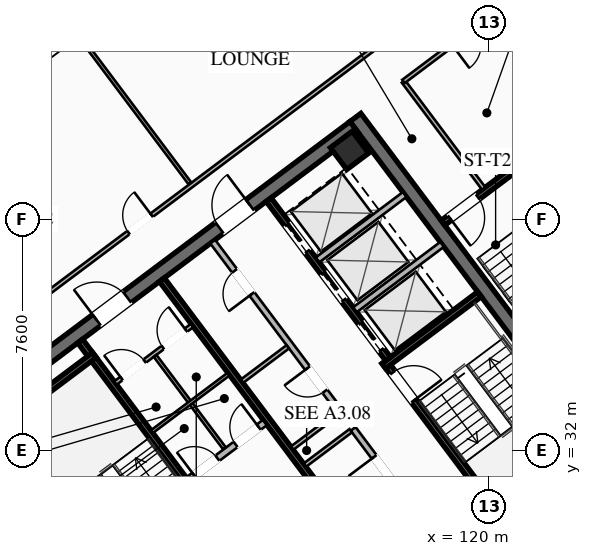
"""IFC4 building model, lengths in metres.
Left out: names, types, materials, properties, quantities, classifications, styles, units other than length and angle.
Written with IfcOpenShell. Run it as: python <this file> out.ifc"""

import sys

from ifc_helpers import new_model, si_unit, direction, frame, frame_2d, origin, origin_2d, place, context, subcontext, project, spatial, rectangle, hollow_rectangle, extrude, element, fill, save


model = new_model("IFC4")
c1 = context("Model", 3, precision=1e-05, world=origin(), true_north=direction((0.0, 1.0)))
c2 = subcontext(c1, "Body", "Model", "MODEL_VIEW")
j1 = project(units=[si_unit("LENGTHUNIT", "METRE"), si_unit("PLANEANGLEUNIT", "RADIAN")], contexts=[c1])
p1 = place(None, origin())
s1 = spatial("IfcSite", under=j1, at=p1, CompositionType="ELEMENT")
p2 = place(p1, origin())
s2 = spatial("IfcBuilding", under=s1, at=p2, CompositionType="ELEMENT")
p3 = place(p2, frame((0.0, 0.0, 218.4)))
s3 = spatial("IfcBuildingStorey", under=s2, at=p3, CompositionType="ELEMENT", Elevation=218.4)
for number, where, z_axis, x_axis in (
    (1, (112.396, 21.047, 0.0), (0.0, 0.0, 1.0), (-0.6, 0.8, 0.0)),
    (2, (115.604, 42.953, 0.0), (0.0, 0.0, 1.0), (0.6, -0.8, 0.0)),
):
    element("IfcWall", number, at=place(p3, frame(where, z_axis=z_axis, x_axis=x_axis)), inside=s3, PredefinedType="SHEAR", context=c2, shape_type="SweptSolid", body=[
        extrude(rectangle(XDim=15.6, YDim=0.45, at=frame_2d((7.8, 0.0))), origin(), (0.0, 0.0, 1.0), 3.55),
    ])
p4 = place(p3, frame((103.351, 33.482, 0.0), z_axis=(0.0, 0.0, 1.0), x_axis=(0.8, 0.6, 0.0)))
e3 = element("IfcWall", 3, at=p4, inside=s3, PredefinedType="SHEAR", context=c2, shape_type="SweptSolid", body=[
    extrude(rectangle(XDim=15.26, YDim=0.45, at=frame_2d((7.63, 0.0))), origin(), (0.0, 0.0, 1.0), 3.55),
])
p5 = place(p4, frame((4.68, 0.0, 0.0)))
e4 = element("IfcOpeningElement", 4, at=p5, cuts=e3, PredefinedType="OPENING", context=c2, shape_type="SweptSolid", body=[
    extrude(rectangle(XDim=1.25, YDim=2.25, at=frame_2d((0.625, 1.125))), frame((0.0, 0.235, 0.0), z_axis=(0.0, -1.0, 0.0), x_axis=(1.0, 0.0, 0.0)), (0.0, 0.0, 1.0), 0.47),
])
p6 = place(p4, frame((9.73, 0.0, 0.0)))
e5 = element("IfcOpeningElement", 5, at=p6, cuts=e3, PredefinedType="OPENING", context=c2, shape_type="SweptSolid", body=[
    extrude(rectangle(XDim=1.25, YDim=2.25, at=frame_2d((0.625, 1.125))), frame((0.0, 0.235, 0.0), z_axis=(0.0, -1.0, 0.0), x_axis=(1.0, 0.0, 0.0)), (0.0, 0.0, 1.0), 0.47),
])
p7 = place(p3, frame((115.41, 41.87, 0.0), z_axis=(0.0, 0.0, 1.0), x_axis=(0.799999996291, 0.600000004945, 0.0)))
e6 = element("IfcColumn", 6, at=p7, inside=s3, PredefinedType="COLUMN", context=c2, shape_type="SweptSolid", body=[
    extrude(hollow_rectangle(XDim=0.9, YDim=0.9, WallThickness=0.04, at=origin_2d()), origin(), (0.0, 0.0, 1.0), 3.37),
])
p8 = place(p3, frame((111.44, 29.08, 0.0), z_axis=(0.0, 0.0, 1.0), x_axis=(-0.59999041401, 0.800007189403, 0.0)))
e7 = element("IfcWall", 7, at=p8, inside=s3, PredefinedType="SHEAR", context=c2, shape_type="SweptSolid", body=[
    extrude(rectangle(XDim=8.15, YDim=0.2, at=frame_2d((4.075, 0.0))), origin(), (0.0, 0.0, 1.0), 3.37),
])
p9 = place(p8, frame((0.45, 0.0, 0.0)))
e8 = element("IfcOpeningElement", 8, at=p9, cuts=e7, PredefinedType="OPENING", context=c2, shape_type="SweptSolid", body=[
    extrude(rectangle(XDim=1.15, YDim=2.2, at=frame_2d((0.575, 1.1))), frame((0.0, 0.11, 0.0), z_axis=(0.0, -1.0, 0.0), x_axis=(1.0, 0.0, 0.0)), (0.0, 0.0, 1.0), 0.22),
])
p10 = place(p3, frame((103.876, 32.782, 0.0), z_axis=(0.0, 0.0, 1.0), x_axis=(0.800014909178, 0.599980120581, 0.0)))
e9 = element("IfcWall", 9, at=p10, inside=s3, PredefinedType="SHEAR", context=c2, shape_type="SweptSolid", body=[
    extrude(rectangle(XDim=3.93, YDim=0.2, at=frame_2d((1.965, 0.0))), origin(), (0.0, 0.0, 1.0), 3.37),
])
p11 = place(p3, frame((116.56, 34.92, 0.0), z_axis=(0.0, 0.0, 1.0), x_axis=(0.59999041401, -0.800007189403, 0.0)))
e10 = element("IfcWall", 10, at=p11, inside=s3, PredefinedType="SHEAR", context=c2, shape_type="SweptSolid", body=[
    extrude(rectangle(XDim=8.15, YDim=0.2, at=frame_2d((4.075, 0.0))), origin(), (0.0, 0.0, 1.0), 3.37),
])
p12 = place(p11, frame((0.45, 0.0, 0.0)))
e11 = element("IfcOpeningElement", 11, at=p12, cuts=e10, PredefinedType="OPENING", context=c2, shape_type="SweptSolid", body=[
    extrude(rectangle(XDim=1.15, YDim=2.2, at=frame_2d((0.575, 1.1))), frame((0.0, 0.11, 0.0), z_axis=(0.0, -1.0, 0.0), x_axis=(1.0, 0.0, 0.0)), (0.0, 0.0, 1.0), 0.22),
])
p13 = place(p3, frame((116.54, 34.78, 0.0), z_axis=(0.0, 0.0, 1.0), x_axis=(0.800014909178, 0.599980120581, 0.0)))
e12 = element("IfcWall", 12, at=p13, inside=s3, PredefinedType="SHEAR", context=c2, shape_type="SweptSolid", body=[
    extrude(rectangle(XDim=3.93, YDim=0.2, at=frame_2d((1.965, 0.0))), origin(), (0.0, 0.0, 1.0), 3.37),
])
p14 = place(p3, frame((118.058, 25.856, 0.0), z_axis=(0.0, 0.0, 1.0), x_axis=(-0.600002657301, 0.799998007018, 0.0)))
e13 = element("IfcWall", 13, at=p14, inside=s3, PredefinedType="SHEAR", context=c2, shape_type="SweptSolid", body=[
    extrude(rectangle(XDim=14.7, YDim=0.2, at=frame_2d((7.35, 0.0))), origin(), (0.0, 0.0, 1.0), 3.37),
])
p15 = place(p3, frame((110.104, 31.028, 0.0), z_axis=(0.0, 0.0, 1.0), x_axis=(0.800018601094, 0.59997519774, 0.0)))
e14 = element("IfcWall", 14, at=p15, inside=s3, PredefinedType="SOLIDWALL", context=c2, shape_type="SweptSolid", body=[
    extrude(rectangle(XDim=3.15, YDim=0.22, at=frame_2d((1.575, 0.0))), origin(), (0.0, 0.0, 1.0), 2.723),
])
p16 = place(p15, frame((0.25, 0.0, 0.0)))
e15 = element("IfcOpeningElement", 15, at=p16, cuts=e14, PredefinedType="OPENING", context=c2, shape_type="SweptSolid", body=[
    extrude(rectangle(XDim=0.95, YDim=2.05, at=frame_2d((0.475, 1.025))), frame((0.0, 0.12, 0.0), z_axis=(0.0, -1.0, 0.0), x_axis=(1.0, 0.0, 0.0)), (0.0, 0.0, 1.0), 0.24),
])
p17 = place(p15, frame((1.95, 0.0, 0.0)))
e16 = element("IfcOpeningElement", 16, at=p17, cuts=e14, PredefinedType="OPENING", context=c2, shape_type="SweptSolid", body=[
    extrude(rectangle(XDim=0.95, YDim=2.05, at=frame_2d((0.475, 1.025))), frame((0.0, 0.12, 0.0), z_axis=(0.0, -1.0, 0.0), x_axis=(1.0, 0.0, 0.0)), (0.0, 0.0, 1.0), 0.24),
])
p18 = place(p3, frame((112.75, 40.25, 0.0), z_axis=(0.0, 0.0, 1.0), x_axis=(0.599994036198, -0.800004472816, 0.0)))
e17 = element("IfcWall", 17, at=p18, inside=s3, PredefinedType="SHEAR", context=c2, shape_type="SweptSolid", body=[
    extrude(rectangle(XDim=6.55, YDim=0.2, at=frame_2d((3.275, 0.0))), origin(), (0.0, 0.0, 1.0), 3.37),
])
p19 = place(p18, frame((5.075, 0.0, 0.0)))
e18 = element("IfcOpeningElement", 18, at=p19, cuts=e17, PredefinedType="OPENING", context=c2, shape_type="SweptSolid", body=[
    extrude(rectangle(XDim=1.1, YDim=2.2, at=frame_2d((0.55, 1.1))), frame((0.0, 0.11, 0.0), z_axis=(0.0, -1.0, 0.0), x_axis=(1.0, 0.0, 0.0)), (0.0, 0.0, 1.0), 0.22),
])
p20 = place(p18, frame((3.025, 0.0, 0.0)))
e19 = element("IfcOpeningElement", 19, at=p20, cuts=e17, PredefinedType="OPENING", context=c2, shape_type="SweptSolid", body=[
    extrude(rectangle(XDim=1.1, YDim=2.2, at=frame_2d((0.55, 1.1))), frame((0.0, 0.11, 0.0), z_axis=(0.0, -1.0, 0.0), x_axis=(1.0, 0.0, 0.0)), (0.0, 0.0, 1.0), 0.22),
])
p21 = place(p18, frame((1.025, 0.0, 0.0)))
e20 = element("IfcOpeningElement", 20, at=p21, cuts=e17, PredefinedType="OPENING", context=c2, shape_type="SweptSolid", body=[
    extrude(rectangle(XDim=1.1, YDim=2.2, at=frame_2d((0.55, 1.1))), frame((0.0, 0.11, 0.0), z_axis=(0.0, -1.0, 0.0), x_axis=(1.0, 0.0, 0.0)), (0.0, 0.0, 1.0), 0.22),
])
for number, where, z_axis, x_axis in (
    (21, (115.59, 36.63, 0.0), (0.0, 0.0, 1.0), (0.8, 0.6, 0.0)),
    (22, (114.36, 38.27, 0.0), (0.0, 0.0, 1.0), (0.8, 0.6, 0.0)),
):
    element("IfcWall", number, at=place(p3, frame(where, z_axis=z_axis, x_axis=x_axis)), inside=s3, PredefinedType="SOLIDWALL", context=c2, shape_type="SweptSolid", body=[
        extrude(rectangle(XDim=3.58, YDim=0.2, at=frame_2d((1.79, 0.0))), origin(), (0.0, 0.0, 1.0), 3.37),
    ])
p22 = place(p3, frame((107.71, 34.22, 0.0), z_axis=(0.0, 0.0, 1.0), x_axis=(0.799981399002, 0.60002480053, 0.0)))
e23 = element("IfcWall", 23, at=p22, inside=s3, PredefinedType="PARTITIONING", context=c2, shape_type="SweptSolid", body=[
    extrude(rectangle(XDim=3.15, YDim=0.135, at=frame_2d((1.575, 0.0))), origin(), (0.0, 0.0, 1.0), 2.723),
])
p23 = place(p22, frame((0.25, 0.0, 0.0)))
e24 = element("IfcOpeningElement", 24, at=p23, cuts=e23, PredefinedType="OPENING", context=c2, shape_type="SweptSolid", body=[
    extrude(rectangle(XDim=0.95, YDim=2.05, at=frame_2d((0.475, 1.025))), frame((0.0, 0.077, 0.0), z_axis=(0.0, -1.0, 0.0), x_axis=(1.0, 0.0, 0.0)), (0.0, 0.0, 1.0), 0.155),
])
p24 = place(p22, frame((1.95, 0.0, 0.0)))
e25 = element("IfcOpeningElement", 25, at=p24, cuts=e23, PredefinedType="OPENING", context=c2, shape_type="SweptSolid", body=[
    extrude(rectangle(XDim=0.95, YDim=2.05, at=frame_2d((0.475, 1.025))), frame((0.0, 0.077, 0.0), z_axis=(0.0, -1.0, 0.0), x_axis=(1.0, 0.0, 0.0)), (0.0, 0.0, 1.0), 0.155),
])
p25 = place(p3, frame((111.296, 32.072, 0.0), z_axis=(0.0, 0.0, 1.0), x_axis=(-0.59995887973, 0.800030838552, 0.0)))
e26 = element("IfcWall", 26, at=p25, inside=s3, PredefinedType="PARTITIONING", context=c2, shape_type="SweptSolid", body=[
    extrude(rectangle(XDim=3.8, YDim=0.11, at=frame_2d((1.9, 0.0))), origin(), (0.0, 0.0, 1.0), 2.723),
])
p26 = place(p3, frame((108.91, 32.62, 0.0), z_axis=(0.0, 0.0, 1.0), x_axis=(0.800018601094, 0.59997519774, 0.0)))
e27 = element("IfcWall", 27, at=p26, inside=s3, PredefinedType="PARTITIONING", context=c2, shape_type="SweptSolid", body=[
    extrude(rectangle(XDim=3.15, YDim=0.11, at=frame_2d((1.575, 0.0))), origin(), (0.0, 0.0, 1.0), 2.723),
])
p27 = place(p3, frame((119.73, 27.11, 0.0), z_axis=(0.0, 0.0, 1.0), x_axis=(-0.600005580459, 0.799995814625, 0.0)))
e28 = element("IfcWall", 28, at=p27, inside=s3, PredefinedType="SOLIDWALL", context=c2, shape_type="SweptSolid", body=[
    extrude(rectangle(XDim=7.0, YDim=0.2, at=frame_2d((3.5, 0.0))), origin(), (0.0, 0.0, 1.0), 2.723),
])
p28 = place(p27, frame((0.85, 0.0, 0.0)))
e29 = element("IfcOpeningElement", 29, at=p28, cuts=e28, PredefinedType="OPENING", context=c2, shape_type="SweptSolid", body=[
    extrude(rectangle(XDim=0.95, YDim=2.05, at=frame_2d((0.475, 1.025))), frame((0.0, 0.11, 0.0), z_axis=(0.0, -1.0, 0.0), x_axis=(1.0, 0.0, 0.0)), (0.0, 0.0, 1.0), 0.22),
])
p29 = place(p27, frame((4.8, 0.0, 0.0)))
e30 = element("IfcOpeningElement", 30, at=p29, cuts=e28, PredefinedType="OPENING", context=c2, shape_type="SweptSolid", body=[
    extrude(rectangle(XDim=1.05, YDim=2.2, at=frame_2d((0.525, 1.1))), frame((0.0, 0.11, 0.0), z_axis=(0.0, -1.0, 0.0), x_axis=(1.0, 0.0, 0.0)), (0.0, 0.0, 1.0), 0.22),
])
p30 = place(p3, frame((113.946, 31.522, 0.0), z_axis=(0.0, 0.0, 1.0), x_axis=(0.8, 0.6, 0.0)))
e31 = element("IfcWall", 31, at=p30, inside=s3, PredefinedType="PARTITIONING", context=c2, shape_type="SweptSolid", body=[
    extrude(rectangle(XDim=1.88, YDim=0.135, at=frame_2d((0.94, 0.0))), origin(), (0.0, 0.0, 1.0), 2.723),
])
p31 = place(p3, frame((115.11, 33.27, 0.0), z_axis=(0.0, 0.0, 1.0), x_axis=(-0.600011160345, 0.79999162962, 0.0)))
e32 = element("IfcWall", 32, at=p31, inside=s3, PredefinedType="SOLIDWALL", context=c2, shape_type="SweptSolid", body=[
    extrude(rectangle(XDim=7.0, YDim=0.2, at=frame_2d((3.5, 0.0))), origin(), (0.0, 0.0, 1.0), 2.723),
])
p32 = place(p31, frame((0.85, 0.0, 0.0)))
e33 = element("IfcOpeningElement", 33, at=p32, cuts=e32, PredefinedType="OPENING", context=c2, shape_type="SweptSolid", body=[
    extrude(rectangle(XDim=0.95, YDim=2.05, at=frame_2d((0.475, 1.025))), frame((0.0, 0.11, 0.0), z_axis=(0.0, -1.0, 0.0), x_axis=(1.0, 0.0, 0.0)), (0.0, 0.0, 1.0), 0.22),
])
p33 = place(p31, frame((4.85, 0.0, 0.0)))
e34 = element("IfcOpeningElement", 34, at=p33, cuts=e32, PredefinedType="OPENING", context=c2, shape_type="SweptSolid", body=[
    extrude(rectangle(XDim=0.95, YDim=2.05, at=frame_2d((0.475, 1.025))), frame((0.0, 0.11, 0.0), z_axis=(0.0, -1.0, 0.0), x_axis=(1.0, 0.0, 0.0)), (0.0, 0.0, 1.0), 0.22),
])
p34 = place(p3, frame((113.526, 32.082, 0.0), z_axis=(0.0, 0.0, 1.0), x_axis=(0.800046745961, 0.599937666993, 0.0)))
e35 = element("IfcWall", 35, at=p34, inside=s3, PredefinedType="PARTITIONING", context=c2, shape_type="SweptSolid", body=[
    extrude(rectangle(XDim=1.88, YDim=0.135, at=frame_2d((0.94, 0.0))), origin(), (0.0, 0.0, 1.0), 2.723),
])
p35 = place(p3, frame((111.876, 34.282, 0.0), z_axis=(0.0, 0.0, 1.0), x_axis=(0.8, 0.6, 0.0)))
e36 = element("IfcWall", 36, at=p35, inside=s3, PredefinedType="PARTITIONING", context=c2, shape_type="SweptSolid", body=[
    extrude(rectangle(XDim=1.88, YDim=0.135, at=frame_2d((0.94, 0.0))), origin(), (0.0, 0.0, 1.0), 2.723),
])
p36 = place(p3, frame((121.204, 41.528, 0.0), z_axis=(0.0, 0.0, 1.0), x_axis=(-0.800017232136, -0.599977023131, 0.0)))
e37 = element("IfcWall", 37, at=p36, inside=s3, PredefinedType="SHEAR", context=c2, shape_type="SweptSolid", body=[
    extrude(rectangle(XDim=3.4, YDim=0.2, at=frame_2d((1.7, 0.0))), origin(), (0.0, 0.0, 1.0), 3.37),
])
p37 = place(p36, frame((1.975, 0.0, 0.0)))
e38 = element("IfcOpeningElement", 38, at=p37, cuts=e37, PredefinedType="OPENING", context=c2, shape_type="SweptSolid", body=[
    extrude(rectangle(XDim=1.15, YDim=2.2, at=frame_2d((0.575, 1.1))), frame((0.0, 0.11, 0.0), z_axis=(0.0, -1.0, 0.0), x_axis=(1.0, 0.0, 0.0)), (0.0, 0.0, 1.0), 0.22),
])
p38 = place(p3, frame((119.824, 40.618, 0.0), z_axis=(0.0, 0.0, 1.0), x_axis=(-0.599982243973, 0.800013316712, 0.0)))
e39 = element("IfcWall", 39, at=p38, inside=s3, PredefinedType="PARTITIONING", context=c2, shape_type="SweptSolid", body=[
    extrude(rectangle(XDim=4.4, YDim=0.135, at=frame_2d((2.2, 0.0))), origin(), (0.0, 0.0, 1.0), 2.723),
])
p39 = place(p3, frame((100.826, 33.682, 0.0), z_axis=(0.0, 0.0, 1.0), x_axis=(0.79999742786, 0.600003429504, 0.0)))
e40 = element("IfcWall", 40, at=p39, inside=s3, PredefinedType="PARTITIONING", context=c2, shape_type="SweptSolid", body=[
    extrude(rectangle(XDim=22.78, YDim=0.135, at=frame_2d((11.39, 0.0))), origin(), (0.0, 0.0, 1.0), 2.723),
])
p40 = place(p39, frame((0.3, 0.0, 0.0)))
e41 = element("IfcOpeningElement", 41, at=p40, cuts=e40, PredefinedType="OPENING", context=c2, shape_type="SweptSolid", body=[
    extrude(rectangle(XDim=0.95, YDim=2.05, at=frame_2d((0.475, 1.025))), frame((0.0, 0.077, 0.0), z_axis=(0.0, -1.0, 0.0), x_axis=(1.0, 0.0, 0.0)), (0.0, 0.0, 1.0), 0.155),
])
p41 = place(p39, frame((9.143, 0.0, 0.0)))
e42 = element("IfcOpeningElement", 42, at=p41, cuts=e40, PredefinedType="OPENING", context=c2, shape_type="SweptSolid", body=[
    extrude(rectangle(XDim=0.95, YDim=2.05, at=frame_2d((0.475, 1.025))), frame((0.0, 0.077, 0.0), z_axis=(0.0, -1.0, 0.0), x_axis=(1.0, 0.0, 0.0)), (0.0, 0.0, 1.0), 0.155),
])
p42 = place(p39, frame((21.53, 0.0, 0.0)))
e43 = element("IfcOpeningElement", 43, at=p42, cuts=e40, PredefinedType="OPENING", context=c2, shape_type="SweptSolid", body=[
    extrude(rectangle(XDim=0.95, YDim=2.05, at=frame_2d((0.475, 1.025))), frame((0.0, 0.077, 0.0), z_axis=(0.0, -1.0, 0.0), x_axis=(1.0, 0.0, 0.0)), (0.0, 0.0, 1.0), 0.155),
])
p43 = place(p3, frame((110.162, 40.784, 0.0), z_axis=(0.0, 0.0, 1.0), x_axis=(-0.600006351355, 0.799995236444, 0.0)))
e44 = element("IfcWall", 44, at=p43, inside=s3, PredefinedType="PARTITIONING", context=c2, shape_type="SweptSolid", body=[
    extrude(rectangle(XDim=6.15, YDim=0.11, at=frame_2d((3.075, 0.0))), origin(), (0.0, 0.0, 1.0), 2.723),
])
p44 = place(p3, frame((121.584, 47.438, 0.0), z_axis=(0.0, 0.0, 1.0), x_axis=(-0.79998934637, -0.600014204577, 0.0)))
e45 = element("IfcWall", 45, at=p44, inside=s3, PredefinedType="PARTITIONING", context=c2, shape_type="SweptSolid", body=[
    extrude(rectangle(XDim=5.5, YDim=0.135, at=frame_2d((2.75, 0.0))), origin(), (0.0, 0.0, 1.0), 2.723),
])
p45 = place(p44, frame((2.55, 0.0, 0.0)))
e46 = element("IfcOpeningElement", 46, at=p45, cuts=e45, PredefinedType="OPENING", context=c2, shape_type="SweptSolid", body=[
    extrude(rectangle(XDim=0.95, YDim=2.05, at=frame_2d((0.475, 1.025))), frame((0.0, 0.077, 0.0), z_axis=(0.0, -1.0, 0.0), x_axis=(1.0, 0.0, 0.0)), (0.0, 0.0, 1.0), 0.155),
])
p46 = place(p3, frame((113.09, 17.33, 0.0), z_axis=(0.0, 0.0, 1.0), x_axis=(-0.60000575578, 0.799995683132, 0.0)))
e47 = element("IfcWall", 47, at=p46, inside=s3, PredefinedType="PARTITIONING", context=c2, shape_type="SweptSolid", body=[
    extrude(rectangle(XDim=20.36, YDim=0.135, at=frame_2d((10.18, 0.0))), origin(), (0.0, 0.0, 1.0), 2.723),
])
p47 = place(p46, frame((0.3, 0.0, 0.0)))
e48 = element("IfcOpeningElement", 48, at=p47, cuts=e47, PredefinedType="OPENING", context=c2, shape_type="SweptSolid", body=[
    extrude(rectangle(XDim=0.95, YDim=2.05, at=frame_2d((0.475, 1.025))), frame((0.0, 0.077, 0.0), z_axis=(0.0, -1.0, 0.0), x_axis=(1.0, 0.0, 0.0)), (0.0, 0.0, 1.0), 0.155),
])
p48 = place(p5, origin())
e49 = element("IfcDoor", 49, at=p48, inside=s3, OperationType="SINGLE_SWING_LEFT", PredefinedType="DOOR", context=c2, shape_type="SweptSolid", body=[
    extrude(rectangle(XDim=1.25, YDim=2.25, at=frame_2d((0.625, 1.125))), frame((0.0, 0.025, 0.0), z_axis=(0.0, -1.0, 0.0), x_axis=(1.0, 0.0, 0.0)), (0.0, 0.0, 1.0), 0.05),
])
fill(e4, e49)
p49 = place(p6, origin())
e50 = element("IfcDoor", 50, at=p49, inside=s3, OperationType="SINGLE_SWING_RIGHT", PredefinedType="DOOR", context=c2, shape_type="SweptSolid", body=[
    extrude(rectangle(XDim=1.25, YDim=2.25, at=frame_2d((0.625, 1.125))), frame((0.0, 0.025, 0.0), z_axis=(0.0, -1.0, 0.0), x_axis=(1.0, 0.0, 0.0)), (0.0, 0.0, 1.0), 0.05),
])
fill(e5, e50)
p50 = place(p12, origin())
e51 = element("IfcDoor", 51, at=p50, inside=s3, OperationType="SINGLE_SWING_RIGHT", PredefinedType="DOOR", context=c2, shape_type="SweptSolid", body=[
    extrude(rectangle(XDim=1.15, YDim=2.2, at=frame_2d((0.575, 1.1))), frame((0.0, 0.025, 0.0), z_axis=(0.0, -1.0, 0.0), x_axis=(1.0, 0.0, 0.0)), (0.0, 0.0, 1.0), 0.05),
])
fill(e11, e51)
p51 = place(p23, origin())
e52 = element("IfcDoor", 52, at=p51, inside=s3, OperationType="SINGLE_SWING_LEFT", PredefinedType="DOOR", context=c2, shape_type="SweptSolid", body=[
    extrude(rectangle(XDim=0.95, YDim=2.05, at=frame_2d((0.475, 1.025))), frame((0.0, 0.025, 0.0), z_axis=(0.0, -1.0, 0.0), x_axis=(1.0, 0.0, 0.0)), (0.0, 0.0, 1.0), 0.05),
])
fill(e24, e52)
p52 = place(p24, origin())
e53 = element("IfcDoor", 53, at=p52, inside=s3, OperationType="SINGLE_SWING_RIGHT", PredefinedType="DOOR", context=c2, shape_type="SweptSolid", body=[
    extrude(rectangle(XDim=0.95, YDim=2.05, at=frame_2d((0.475, 1.025))), frame((0.0, 0.025, 0.0), z_axis=(0.0, -1.0, 0.0), x_axis=(1.0, 0.0, 0.0)), (0.0, 0.0, 1.0), 0.05),
])
fill(e25, e53)
p53 = place(p16, origin())
e54 = element("IfcDoor", 54, at=p53, inside=s3, OperationType="SINGLE_SWING_LEFT", PredefinedType="DOOR", context=c2, shape_type="SweptSolid", body=[
    extrude(rectangle(XDim=0.95, YDim=2.05, at=frame_2d((0.475, 1.025))), frame((0.0, 0.025, 0.0), z_axis=(0.0, -1.0, 0.0), x_axis=(1.0, 0.0, 0.0)), (0.0, 0.0, 1.0), 0.05),
])
fill(e15, e54)
p54 = place(p17, origin())
e55 = element("IfcDoor", 55, at=p54, inside=s3, OperationType="SINGLE_SWING_RIGHT", PredefinedType="DOOR", context=c2, shape_type="SweptSolid", body=[
    extrude(rectangle(XDim=0.95, YDim=2.05, at=frame_2d((0.475, 1.025))), frame((0.0, 0.025, 0.0), z_axis=(0.0, -1.0, 0.0), x_axis=(1.0, 0.0, 0.0)), (0.0, 0.0, 1.0), 0.05),
])
fill(e16, e55)
p55 = place(p29, origin())
e56 = element("IfcDoor", 56, at=p55, inside=s3, OperationType="SINGLE_SWING_RIGHT", PredefinedType="DOOR", context=c2, shape_type="SweptSolid", body=[
    extrude(rectangle(XDim=1.05, YDim=2.2, at=frame_2d((0.525, 1.1))), frame((0.0, 0.025, 0.0), z_axis=(0.0, -1.0, 0.0), x_axis=(1.0, 0.0, 0.0)), (0.0, 0.0, 1.0), 0.05),
])
fill(e30, e56)
p56 = place(p32, origin())
e57 = element("IfcDoor", 57, at=p56, inside=s3, OperationType="SINGLE_SWING_RIGHT", PredefinedType="DOOR", context=c2, shape_type="SweptSolid", body=[
    extrude(rectangle(XDim=0.95, YDim=2.05, at=frame_2d((0.475, 1.025))), frame((0.0, 0.025, 0.0), z_axis=(0.0, -1.0, 0.0), x_axis=(1.0, 0.0, 0.0)), (0.0, 0.0, 1.0), 0.05),
])
fill(e33, e57)
p57 = place(p33, origin())
e58 = element("IfcDoor", 58, at=p57, inside=s3, OperationType="SINGLE_SWING_LEFT", PredefinedType="DOOR", context=c2, shape_type="SweptSolid", body=[
    extrude(rectangle(XDim=0.95, YDim=2.05, at=frame_2d((0.475, 1.025))), frame((0.0, 0.025, 0.0), z_axis=(0.0, -1.0, 0.0), x_axis=(1.0, 0.0, 0.0)), (0.0, 0.0, 1.0), 0.05),
])
fill(e34, e58)
p58 = place(p37, origin())
e59 = element("IfcDoor", 59, at=p58, inside=s3, OperationType="SINGLE_SWING_RIGHT", PredefinedType="DOOR", context=c2, shape_type="SweptSolid", body=[
    extrude(rectangle(XDim=1.15, YDim=2.2, at=frame_2d((0.575, 1.1))), frame((0.0, 0.025, 0.0), z_axis=(0.0, -1.0, 0.0), x_axis=(1.0, 0.0, 0.0)), (0.0, 0.0, 1.0), 0.05),
])
fill(e38, e59)
p59 = place(p41, origin())
e60 = element("IfcDoor", 60, at=p59, inside=s3, OperationType="SINGLE_SWING_RIGHT", PredefinedType="DOOR", context=c2, shape_type="SweptSolid", body=[
    extrude(rectangle(XDim=0.95, YDim=2.05, at=frame_2d((0.475, 1.025))), frame((0.0, 0.025, 0.0), z_axis=(0.0, -1.0, 0.0), x_axis=(1.0, 0.0, 0.0)), (0.0, 0.0, 1.0), 0.05),
])
fill(e42, e60)
p60 = place(p19, origin())
e61 = element("IfcDoor", 61, at=p60, inside=s3, OperationType="SLIDING_TO_LEFT", PredefinedType="DOOR", context=c2, shape_type="SweptSolid", body=[
    extrude(rectangle(XDim=1.1, YDim=2.2, at=frame_2d((0.55, 1.1))), frame((0.0, 0.025, 0.0), z_axis=(0.0, -1.0, 0.0), x_axis=(1.0, 0.0, 0.0)), (0.0, 0.0, 1.0), 0.05),
])
fill(e18, e61)
p61 = place(p20, origin())
e62 = element("IfcDoor", 62, at=p61, inside=s3, OperationType="SLIDING_TO_LEFT", PredefinedType="DOOR", context=c2, shape_type="SweptSolid", body=[
    extrude(rectangle(XDim=1.1, YDim=2.2, at=frame_2d((0.55, 1.1))), frame((0.0, 0.025, 0.0), z_axis=(0.0, -1.0, 0.0), x_axis=(1.0, 0.0, 0.0)), (0.0, 0.0, 1.0), 0.05),
])
fill(e19, e62)
p62 = place(p21, origin())
e63 = element("IfcDoor", 63, at=p62, inside=s3, OperationType="SLIDING_TO_LEFT", PredefinedType="DOOR", context=c2, shape_type="SweptSolid", body=[
    extrude(rectangle(XDim=1.1, YDim=2.2, at=frame_2d((0.55, 1.1))), frame((0.0, 0.025, 0.0), z_axis=(0.0, -1.0, 0.0), x_axis=(1.0, 0.0, 0.0)), (0.0, 0.0, 1.0), 0.05),
])
fill(e20, e63)
save(model, sys.argv[1])
